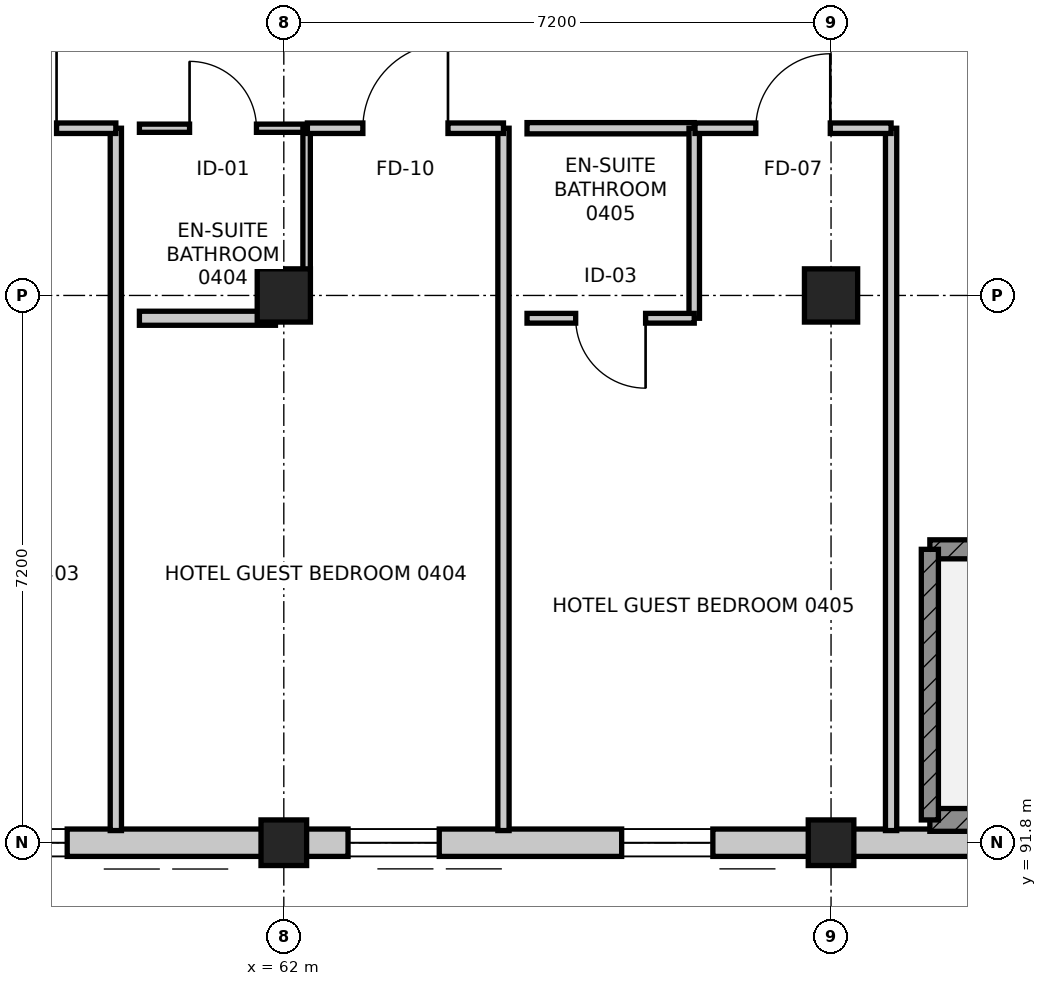
"""IFC4 building model, lengths in metres.
Left out: names, types, materials, properties, quantities, classifications, styles, units other than length and angle.
Written with IfcOpenShell. Run it as: python <this file> out.ifc"""

import sys

from ifc_helpers import new_model, si_unit, direction, frame, frame_2d, origin, origin_2d, place, context, subcontext, project, spatial, rectangle, extrude, element, fill, save


model = new_model("IFC4")
c1 = context("Model", 3, precision=1e-05, world=origin(), true_north=direction((0.0, 1.0)))
c2 = subcontext(c1, "Body", "Model", "MODEL_VIEW")
j1 = project(units=[si_unit("LENGTHUNIT", "METRE"), si_unit("PLANEANGLEUNIT", "RADIAN")], contexts=[c1])
p1 = place(None, origin())
s1 = spatial("IfcSite", under=j1, at=p1, CompositionType="ELEMENT")
p2 = place(p1, origin())
s2 = spatial("IfcBuilding", under=s1, at=p2, CompositionType="ELEMENT")
p3 = place(p2, frame((0.0, 0.0, 19.2)))
s3 = spatial("IfcBuildingStorey", under=s2, at=p3, CompositionType="ELEMENT", Elevation=19.2)
p4 = place(p3, frame((62.0, 91.8, 0.0), z_axis=(0.0, 0.0, 1.0), x_axis=(1.0, 0.0, 0.0)))
e1 = element("IfcColumn", 1, at=p4, inside=s3, PredefinedType="COLUMN", context=c2, shape_type="SweptSolid", body=[
    extrude(rectangle(XDim=0.6, YDim=0.6, at=origin_2d()), origin(), (0.0, 0.0, 1.0), 3.6),
])
p5 = place(p3, frame((62.0, 99.0, 0.0), z_axis=(0.0, 0.0, 1.0), x_axis=(1.0, 0.0, 0.0)))
e2 = element("IfcColumn", 2, at=p5, inside=s3, PredefinedType="COLUMN", context=c2, shape_type="SweptSolid", body=[
    extrude(rectangle(XDim=0.7, YDim=0.7, at=origin_2d()), origin(), (0.0, 0.0, 1.0), 3.6),
])
p6 = place(p3, frame((69.2, 91.8, 0.0), z_axis=(0.0, 0.0, 1.0), x_axis=(1.0, 0.0, 0.0)))
e3 = element("IfcColumn", 3, at=p6, inside=s3, PredefinedType="COLUMN", context=c2, shape_type="SweptSolid", body=[
    extrude(rectangle(XDim=0.6, YDim=0.6, at=origin_2d()), origin(), (0.0, 0.0, 1.0), 3.6),
])
p7 = place(p3, frame((69.2, 99.0, 0.0), z_axis=(0.0, 0.0, 1.0), x_axis=(1.0, 0.0, 0.0)))
e4 = element("IfcColumn", 4, at=p7, inside=s3, PredefinedType="COLUMN", context=c2, shape_type="SweptSolid", body=[
    extrude(rectangle(XDim=0.7, YDim=0.7, at=origin_2d()), origin(), (0.0, 0.0, 1.0), 3.6),
])
p8 = place(p3, frame((76.4, 91.8, 0.0), z_axis=(0.0, 0.0, 1.0), x_axis=(-1.0, 0.0, 0.0)))
e5 = element("IfcWall", 5, at=p8, inside=s3, PredefinedType="STANDARD", context=c2, shape_type="SweptSolid", body=[
    extrude(rectangle(XDim=7.2, YDim=0.36, at=frame_2d((3.6, 0.0))), origin(), (0.0, 0.0, 1.0), 3.35),
])
p9 = place(p8, frame((3.0, 0.0, 0.9)))
e6 = element("IfcOpeningElement", 6, at=p9, cuts=e5, PredefinedType="OPENING", context=c2, shape_type="SweptSolid", body=[
    extrude(rectangle(XDim=1.2, YDim=1.8, at=frame_2d((0.6, 0.9))), frame((0.0, 0.19, 0.0), z_axis=(0.0, -1.0, 0.0), x_axis=(1.0, 0.0, 0.0)), (0.0, 0.0, 1.0), 0.38),
])
p10 = place(p8, frame((1.05, 0.0, 0.85)))
e7 = element("IfcOpeningElement", 7, at=p10, cuts=e5, PredefinedType="OPENING", context=c2, shape_type="SweptSolid", body=[
    extrude(rectangle(XDim=1.2, YDim=1.8, at=frame_2d((0.6, 0.9))), frame((0.0, 0.19, 0.0), z_axis=(0.0, -1.0, 0.0), x_axis=(1.0, 0.0, 0.0)), (0.0, 0.0, 1.0), 0.38),
])
p11 = place(p3, frame((69.2, 91.8, 0.0), z_axis=(0.0, 0.0, 1.0), x_axis=(-1.0, 0.0, 0.0)))
e8 = element("IfcWall", 8, at=p11, inside=s3, PredefinedType="STANDARD", context=c2, shape_type="SweptSolid", body=[
    extrude(rectangle(XDim=7.2, YDim=0.36, at=frame_2d((3.6, 0.0))), origin(), (0.0, 0.0, 1.0), 2.735),
])
p12 = place(p11, frame((1.555, 0.0, 0.75)))
e9 = element("IfcOpeningElement", 9, at=p12, cuts=e8, PredefinedType="OPENING", context=c2, shape_type="SweptSolid", body=[
    extrude(rectangle(XDim=1.2, YDim=1.5, at=frame_2d((0.6, 0.75))), frame((0.0, 0.19, 0.0), z_axis=(0.0, -1.0, 0.0), x_axis=(1.0, 0.0, 0.0)), (0.0, 0.0, 1.0), 0.38),
])
p13 = place(p11, frame((5.155, 0.0, 0.75)))
e10 = element("IfcOpeningElement", 10, at=p13, cuts=e8, PredefinedType="OPENING", context=c2, shape_type="SweptSolid", body=[
    extrude(rectangle(XDim=1.2, YDim=1.5, at=frame_2d((0.6, 0.75))), frame((0.0, 0.19, 0.0), z_axis=(0.0, -1.0, 0.0), x_axis=(1.0, 0.0, 0.0)), (0.0, 0.0, 1.0), 0.38),
])
p14 = place(p3, frame((62.0, 91.8, 0.0), z_axis=(0.0, 0.0, 1.0), x_axis=(-1.0, 0.0, 0.0)))
e11 = element("IfcWall", 11, at=p14, inside=s3, PredefinedType="STANDARD", context=c2, shape_type="SweptSolid", body=[
    extrude(rectangle(XDim=7.2, YDim=0.36, at=frame_2d((3.6, 0.0))), origin(), (0.0, 0.0, 1.0), 2.735),
])
p15 = place(p14, frame((2.85, 0.0, 0.75)))
e12 = element("IfcOpeningElement", 12, at=p15, cuts=e11, PredefinedType="OPENING", context=c2, shape_type="SweptSolid", body=[
    extrude(rectangle(XDim=1.5, YDim=1.5, at=frame_2d((0.75, 0.75))), frame((0.0, 0.19, 0.0), z_axis=(0.0, -1.0, 0.0), x_axis=(1.0, 0.0, 0.0)), (0.0, 0.0, 1.0), 0.38),
])
p16 = place(p3, frame((70.5, 92.1, 0.0), z_axis=(0.0, 0.0, 1.0), x_axis=(1.0, 0.0, 0.0)))
e13 = element("IfcWall", 13, at=p16, inside=s3, PredefinedType="SHEAR", context=c2, shape_type="SweptSolid", body=[
    extrude(rectangle(XDim=8.4, YDim=0.3, at=frame_2d((4.2, 0.0))), origin(), (0.0, 0.0, 1.0), 3.35),
])
p17 = place(p3, frame((78.9, 95.66, 0.0), z_axis=(0.0, 0.0, 1.0), x_axis=(-1.0, 0.0, 0.0)))
e14 = element("IfcWall", 14, at=p17, inside=s3, PredefinedType="SHEAR", context=c2, shape_type="SweptSolid", body=[
    extrude(rectangle(XDim=8.4, YDim=0.25, at=frame_2d((4.2, 0.0))), origin(), (0.0, 0.0, 1.0), 3.35),
])
p18 = place(p17, frame((0.39, 0.0, 0.0)))
e15 = element("IfcOpeningElement", 15, at=p18, cuts=e14, PredefinedType="OPENING", context=c2, shape_type="SweptSolid", body=[
    extrude(rectangle(XDim=1.1, YDim=2.1, at=frame_2d((0.55, 1.05))), frame((0.0, 0.135, 0.0), z_axis=(0.0, -1.0, 0.0), x_axis=(1.0, 0.0, 0.0)), (0.0, 0.0, 1.0), 0.27),
])
p19 = place(p3, frame((70.5, 95.66, 0.0), z_axis=(0.0, 0.0, 1.0), x_axis=(0.0, -1.0, 0.0)))
e16 = element("IfcWall", 16, at=p19, inside=s3, PredefinedType="SHEAR", context=c2, shape_type="SweptSolid", body=[
    extrude(rectangle(XDim=3.56, YDim=0.225, at=frame_2d((1.78, 0.0))), origin(), (0.0, 0.0, 1.0), 3.35),
])
p20 = place(p3, frame((59.79, 101.2, 0.0), z_axis=(0.0, 0.0, 1.0), x_axis=(0.0, -1.0, 0.0)))
e17 = element("IfcWall", 17, at=p20, inside=s3, PredefinedType="PARTITIONING", context=c2, shape_type="SweptSolid", body=[
    extrude(rectangle(XDim=9.24, YDim=0.148, at=frame_2d((4.62, 0.0))), origin(), (0.0, 0.0, 1.0), 2.735),
])
p21 = place(p3, frame((57.21, 101.2, 0.0), z_axis=(0.0, 0.0, 1.0), x_axis=(1.0, 0.0, 0.0)))
e18 = element("IfcWall", 18, at=p21, inside=s3, PredefinedType="PARTITIONING", context=c2, shape_type="SweptSolid", body=[
    extrude(rectangle(XDim=2.58, YDim=0.138, at=frame_2d((1.29, 0.0))), origin(), (0.0, 0.0, 1.0), 3.35),
])
p22 = place(p21, frame((0.78, 0.0, 0.0)))
e19 = element("IfcOpeningElement", 19, at=p22, cuts=e18, PredefinedType="OPENING", context=c2, shape_type="SweptSolid", body=[
    extrude(rectangle(XDim=1.02, YDim=2.15, at=frame_2d((0.51, 1.075))), frame((0.0, 0.079, 0.0), z_axis=(0.0, -1.0, 0.0), x_axis=(1.0, 0.0, 0.0)), (0.0, 0.0, 1.0), 0.158),
])
p23 = place(p3, frame((60.1, 101.2, 0.0), z_axis=(0.0, 0.0, 1.0), x_axis=(1.0, 0.0, 0.0)))
e20 = element("IfcWall", 20, at=p23, inside=s3, PredefinedType="PARTITIONING", context=c2, shape_type="SweptSolid", body=[
    extrude(rectangle(XDim=2.2, YDim=0.108, at=frame_2d((1.1, 0.0))), origin(), (0.0, 0.0, 1.0), 2.685),
])
p24 = place(p23, frame((0.66, 0.0, 0.0)))
e21 = element("IfcOpeningElement", 21, at=p24, cuts=e20, PredefinedType="OPENING", context=c2, shape_type="SweptSolid", body=[
    extrude(rectangle(XDim=0.88, YDim=2.06, at=frame_2d((0.44, 1.03))), frame((0.0, 0.064, 0.0), z_axis=(0.0, -1.0, 0.0), x_axis=(1.0, 0.0, 0.0)), (0.0, 0.0, 1.0), 0.128),
])
p25 = place(p3, frame((62.3, 101.2, 0.0), z_axis=(0.0, 0.0, 1.0), x_axis=(0.0, -1.0, 0.0)))
e22 = element("IfcWall", 22, at=p25, inside=s3, PredefinedType="PARTITIONING", context=c2, shape_type="SweptSolid", body=[
    extrude(rectangle(XDim=2.09, YDim=0.098, at=frame_2d((1.045, 0.0))), origin(), (0.0, 0.0, 1.0), 2.735),
])
p26 = place(p3, frame((61.89, 98.7, 0.0), z_axis=(0.0, 0.0, 1.0), x_axis=(-1.0, 0.0, 0.0)))
e23 = element("IfcWall", 23, at=p26, inside=s3, PredefinedType="PARTITIONING", context=c2, shape_type="SweptSolid", body=[
    extrude(rectangle(XDim=1.79, YDim=0.185, at=frame_2d((0.895, 0.0))), origin(), (0.0, 0.0, 1.0), 2.685),
])
p27 = place(p3, frame((64.89, 101.2, 0.0), z_axis=(0.0, 0.0, 1.0), x_axis=(0.0, -1.0, 0.0)))
e24 = element("IfcWall", 24, at=p27, inside=s3, PredefinedType="PARTITIONING", context=c2, shape_type="SweptSolid", body=[
    extrude(rectangle(XDim=9.24, YDim=0.148, at=frame_2d((4.62, 0.0))), origin(), (0.0, 0.0, 1.0), 2.735),
])
p28 = place(p3, frame((62.31, 101.2, 0.0), z_axis=(0.0, 0.0, 1.0), x_axis=(1.0, 0.0, 0.0)))
e25 = element("IfcWall", 25, at=p28, inside=s3, PredefinedType="PARTITIONING", context=c2, shape_type="SweptSolid", body=[
    extrude(rectangle(XDim=2.58, YDim=0.138, at=frame_2d((1.29, 0.0))), origin(), (0.0, 0.0, 1.0), 3.35),
])
p29 = place(p28, frame((0.73, 0.0, 0.0)))
e26 = element("IfcOpeningElement", 26, at=p29, cuts=e25, PredefinedType="OPENING", context=c2, shape_type="SweptSolid", body=[
    extrude(rectangle(XDim=1.12, YDim=2.2, at=frame_2d((0.56, 1.1))), frame((0.0, 0.079, 0.0), z_axis=(0.0, -1.0, 0.0), x_axis=(1.0, 0.0, 0.0)), (0.0, 0.0, 1.0), 0.158),
])
p30 = place(p3, frame((65.2, 101.2, 0.0), z_axis=(0.0, 0.0, 1.0), x_axis=(1.0, 0.0, 0.0)))
e27 = element("IfcWall", 27, at=p30, inside=s3, PredefinedType="PARTITIONING", context=c2, shape_type="SweptSolid", body=[
    extrude(rectangle(XDim=2.2, YDim=0.148, at=frame_2d((1.1, 0.0))), origin(), (0.0, 0.0, 1.0), 3.35),
])
p31 = place(p3, frame((67.4, 101.2, 0.0), z_axis=(0.0, 0.0, 1.0), x_axis=(0.0, -1.0, 0.0)))
e28 = element("IfcWall", 28, at=p31, inside=s3, PredefinedType="PARTITIONING", context=c2, shape_type="SweptSolid", body=[
    extrude(rectangle(XDim=2.5, YDim=0.138, at=frame_2d((1.25, 0.0))), origin(), (0.0, 0.0, 1.0), 2.735),
])
p32 = place(p3, frame((67.4, 98.7, 0.0), z_axis=(0.0, 0.0, 1.0), x_axis=(-1.0, 0.0, 0.0)))
e29 = element("IfcWall", 29, at=p32, inside=s3, PredefinedType="PARTITIONING", context=c2, shape_type="SweptSolid", body=[
    extrude(rectangle(XDim=2.2, YDim=0.128, at=frame_2d((1.1, 0.0))), origin(), (0.0, 0.0, 1.0), 3.35),
])
p33 = place(p32, frame((0.64, 0.0, 0.0)))
e30 = element("IfcOpeningElement", 30, at=p33, cuts=e29, PredefinedType="OPENING", context=c2, shape_type="SweptSolid", body=[
    extrude(rectangle(XDim=0.92, YDim=2.1, at=frame_2d((0.46, 1.05))), frame((0.0, 0.074, 0.0), z_axis=(0.0, -1.0, 0.0), x_axis=(1.0, 0.0, 0.0)), (0.0, 0.0, 1.0), 0.148),
])
p34 = place(p3, frame((69.99, 101.2, 0.0), z_axis=(0.0, 0.0, 1.0), x_axis=(0.0, -1.0, 0.0)))
e31 = element("IfcWall", 31, at=p34, inside=s3, PredefinedType="PARTITIONING", context=c2, shape_type="SweptSolid", body=[
    extrude(rectangle(XDim=9.24, YDim=0.148, at=frame_2d((4.62, 0.0))), origin(), (0.0, 0.0, 1.0), 2.735),
])
p35 = place(p3, frame((67.41, 101.2, 0.0), z_axis=(0.0, 0.0, 1.0), x_axis=(1.0, 0.0, 0.0)))
e32 = element("IfcWall", 32, at=p35, inside=s3, PredefinedType="PARTITIONING", context=c2, shape_type="SweptSolid", body=[
    extrude(rectangle(XDim=2.58, YDim=0.138, at=frame_2d((1.29, 0.0))), origin(), (0.0, 0.0, 1.0), 2.685),
])
p36 = place(p35, frame((0.8, 0.0, 0.0)))
e33 = element("IfcOpeningElement", 33, at=p36, cuts=e32, PredefinedType="OPENING", context=c2, shape_type="SweptSolid", body=[
    extrude(rectangle(XDim=0.98, YDim=2.15, at=frame_2d((0.49, 1.075))), frame((0.0, 0.079, 0.0), z_axis=(0.0, -1.0, 0.0), x_axis=(1.0, 0.0, 0.0)), (0.0, 0.0, 1.0), 0.158),
])
p37 = place(p12, origin())
e34 = element("IfcWindow", 34, at=p37, inside=s3, PartitioningType="SINGLE_PANEL", PredefinedType="WINDOW", context=c2, shape_type="SweptSolid", body=[
    extrude(rectangle(XDim=1.2, YDim=1.5, at=frame_2d((0.6, 0.75))), frame((0.0, 0.03, 0.0), z_axis=(0.0, -1.0, 0.0), x_axis=(1.0, 0.0, 0.0)), (0.0, 0.0, 1.0), 0.06),
])
fill(e9, e34)
p38 = place(p15, origin())
e35 = element("IfcWindow", 35, at=p38, inside=s3, PartitioningType="SINGLE_PANEL", PredefinedType="WINDOW", context=c2, shape_type="SweptSolid", body=[
    extrude(rectangle(XDim=1.5, YDim=1.5, at=frame_2d((0.75, 0.75))), frame((0.0, 0.03, 0.0), z_axis=(0.0, -1.0, 0.0), x_axis=(1.0, 0.0, 0.0)), (0.0, 0.0, 1.0), 0.06),
])
fill(e12, e35)
p39 = place(p22, origin())
e36 = element("IfcDoor", 36, at=p39, inside=s3, OperationType="SINGLE_SWING_RIGHT", PredefinedType="DOOR", context=c2, shape_type="SweptSolid", body=[
    extrude(rectangle(XDim=1.02, YDim=2.15, at=frame_2d((0.51, 1.075))), frame((0.0, 0.025, 0.0), z_axis=(0.0, -1.0, 0.0), x_axis=(1.0, 0.0, 0.0)), (0.0, 0.0, 1.0), 0.05),
])
fill(e19, e36)
p40 = place(p24, origin())
e37 = element("IfcDoor", 37, at=p40, inside=s3, OperationType="SINGLE_SWING_LEFT", PredefinedType="DOOR", context=c2, shape_type="SweptSolid", body=[
    extrude(rectangle(XDim=0.88, YDim=2.06, at=frame_2d((0.44, 1.03))), frame((0.0, 0.025, 0.0), z_axis=(0.0, -1.0, 0.0), x_axis=(1.0, 0.0, 0.0)), (0.0, 0.0, 1.0), 0.05),
])
fill(e21, e37)
p41 = place(p29, origin())
e38 = element("IfcDoor", 38, at=p41, inside=s3, OperationType="SINGLE_SWING_RIGHT", PredefinedType="DOOR", context=c2, shape_type="SweptSolid", body=[
    extrude(rectangle(XDim=1.12, YDim=2.2, at=frame_2d((0.56, 1.1))), frame((0.0, 0.025, 0.0), z_axis=(0.0, -1.0, 0.0), x_axis=(1.0, 0.0, 0.0)), (0.0, 0.0, 1.0), 0.05),
])
fill(e26, e38)
p42 = place(p33, origin())
e39 = element("IfcDoor", 39, at=p42, inside=s3, OperationType="SINGLE_SWING_LEFT", PredefinedType="DOOR", context=c2, shape_type="SweptSolid", body=[
    extrude(rectangle(XDim=0.92, YDim=2.1, at=frame_2d((0.46, 1.05))), frame((0.0, 0.025, 0.0), z_axis=(0.0, -1.0, 0.0), x_axis=(1.0, 0.0, 0.0)), (0.0, 0.0, 1.0), 0.05),
])
fill(e30, e39)
p43 = place(p36, origin())
e40 = element("IfcDoor", 40, at=p43, inside=s3, OperationType="SINGLE_SWING_RIGHT", PredefinedType="DOOR", context=c2, shape_type="SweptSolid", body=[
    extrude(rectangle(XDim=0.98, YDim=2.15, at=frame_2d((0.49, 1.075))), frame((0.0, 0.025, 0.0), z_axis=(0.0, -1.0, 0.0), x_axis=(1.0, 0.0, 0.0)), (0.0, 0.0, 1.0), 0.05),
])
fill(e33, e40)
p44 = place(p13, origin())
e41 = element("IfcWindow", 41, at=p44, inside=s3, PartitioningType="SINGLE_PANEL", PredefinedType="WINDOW", context=c2, shape_type="SweptSolid", body=[
    extrude(rectangle(XDim=1.2, YDim=1.5, at=frame_2d((0.6, 0.75))), frame((0.0, 0.03, 0.0), z_axis=(0.0, -1.0, 0.0), x_axis=(1.0, 0.0, 0.0)), (0.0, 0.0, 1.0), 0.06),
])
fill(e10, e41)
save(model, sys.argv[1])
